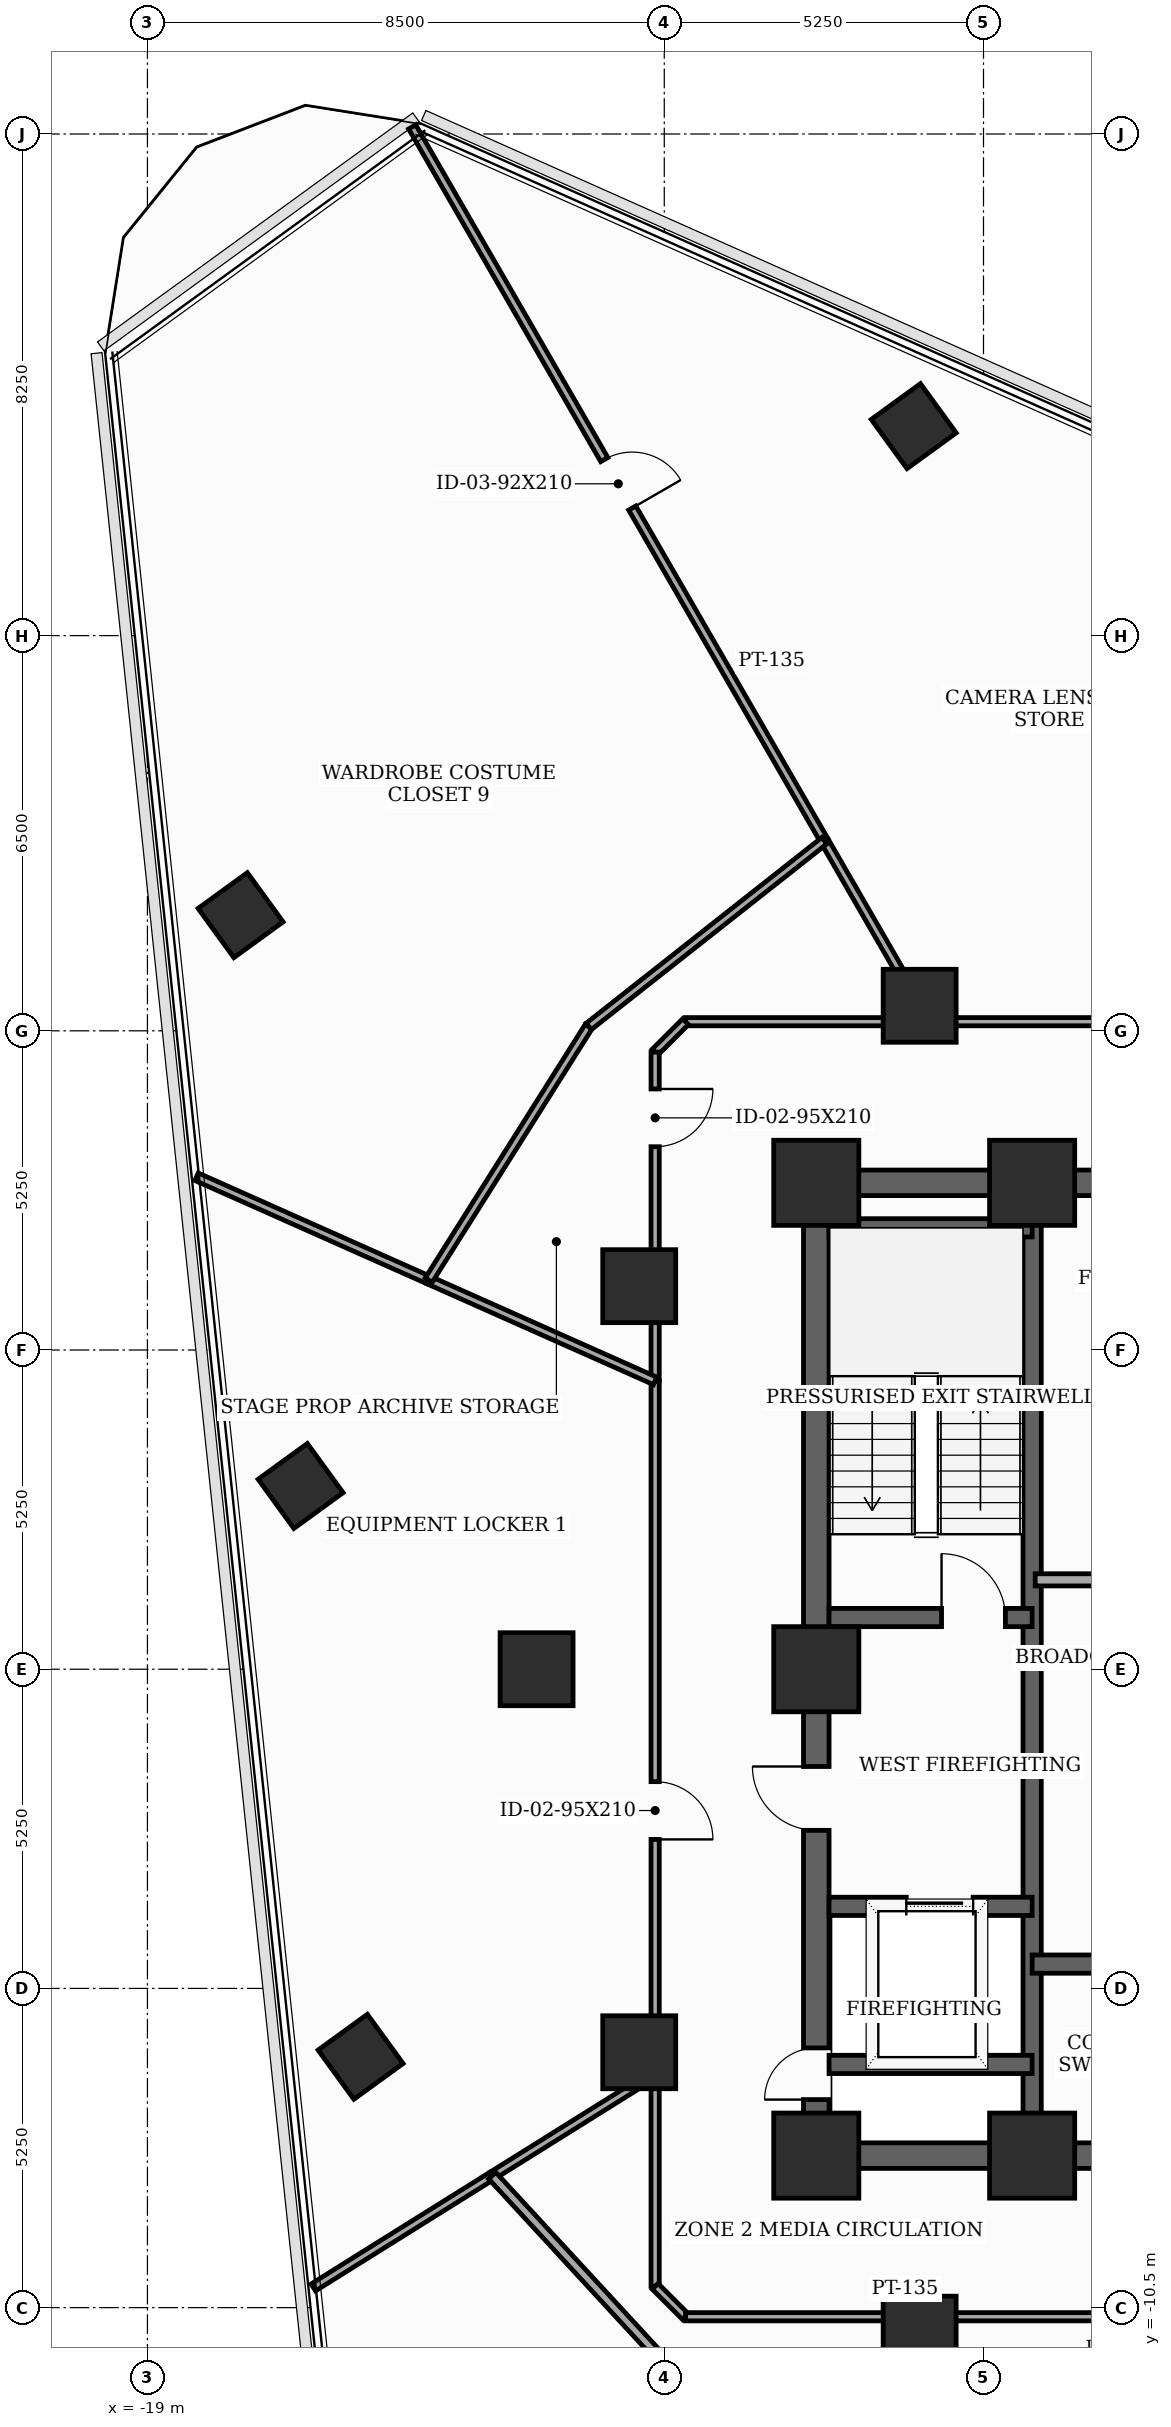
"""IFC4 building model, lengths in metres.
Left out: names, types, materials, properties, quantities, classifications, styles, units other than length and angle.
Written with IfcOpenShell. Run it as: python <this file> out.ifc"""

import sys

from ifc_helpers import new_model, si_unit, direction, frame, frame_2d, origin, origin_2d, place, context, subcontext, project, spatial, rectangle, extrude, element, fill, save


model = new_model("IFC4")
c1 = context("Model", 3, precision=1e-05, world=origin(), true_north=direction((0.0, 1.0)))
c2 = subcontext(c1, "Body", "Model", "MODEL_VIEW")
j1 = project(units=[si_unit("LENGTHUNIT", "METRE"), si_unit("PLANEANGLEUNIT", "RADIAN")], contexts=[c1])
p1 = place(None, origin())
s1 = spatial("IfcSite", under=j1, at=p1, CompositionType="ELEMENT")
p2 = place(p1, origin())
s2 = spatial("IfcBuilding", under=s1, at=p2, CompositionType="ELEMENT")
p3 = place(p2, frame((0.0, 0.0, 158.3)))
s3 = spatial("IfcBuildingStorey", under=s2, at=p3, CompositionType="ELEMENT", Elevation=158.3)
for number, where, z_axis, x_axis in (
    (1, (-8.0, -8.0, 0.0), (0.0, 0.0, 1.0), (1.0, 0.0, 0.0)),
    (2, (-4.45, -8.0, 0.0), (0.0, 0.0, 1.0), (1.0, 0.0, 0.0)),
    (3, (-4.45, 8.0, 0.0), (0.0, 0.0, 1.0), (1.0, 0.0, 0.0)),
    (4, (-8.0, 8.0, 0.0), (0.0, 0.0, 1.0), (1.0, 0.0, 0.0)),
    (5, (-8.0, 0.0, 0.0), (0.0, 0.0, 1.0), (1.0, 0.0, 0.0)),
):
    element("IfcColumn", number, at=place(p3, frame(where, z_axis=z_axis, x_axis=x_axis)), inside=s3, PredefinedType="COLUMN", context=c2, shape_type="SweptSolid", body=[
        extrude(rectangle(XDim=1.4, YDim=1.4, at=origin_2d()), origin(), (0.0, 0.0, 1.0), 3.7),
    ])
for number, where, z_axis, x_axis in (
    (6, (-6.3, 10.912, 0.0), (0.0, 0.0, 1.0), (1.0, 0.0, 0.0)),
    (7, (-10.912, 6.3, 0.0), (0.0, 0.0, 1.0), (1.0, 0.0, 0.0)),
    (8, (-12.6, 0.0, 0.0), (0.0, 0.0, 1.0), (1.0, 0.0, 0.0)),
    (9, (-10.912, -6.3, 0.0), (0.0, 0.0, 1.0), (1.0, 0.0, 0.0)),
    (10, (-6.3, -10.912, 0.0), (0.0, 0.0, 1.0), (1.0, 0.0, 0.0)),
):
    element("IfcColumn", number, at=place(p3, frame(where, z_axis=z_axis, x_axis=x_axis)), inside=s3, PredefinedType="COLUMN", context=c2, shape_type="SweptSolid", body=[
        extrude(rectangle(XDim=1.2, YDim=1.2, at=origin_2d()), origin(), (0.0, 0.0, 1.0), 3.7),
    ])
for number, where, z_axis, x_axis in (
    (11, (-6.397, 20.445, 0.0), (0.0, 0.0, 1.0), (0.809, 0.588, 0.0)),
    (12, (-17.468, 12.402, 0.0), (0.0, 0.0, 1.0), (0.809, 0.588, 0.0)),
    (13, (-16.481, 3.014, 0.0), (0.0, 0.0, 1.0), (0.809, 0.588, 0.0)),
    (14, (-15.494, -6.375, 0.0), (0.0, 0.0, 1.0), (0.809, 0.588, 0.0)),
):
    element("IfcColumn", number, at=place(p3, frame(where, z_axis=z_axis, x_axis=x_axis)), inside=s3, PredefinedType="COLUMN", context=c2, shape_type="SweptSolid", body=[
        extrude(rectangle(XDim=1.0, YDim=1.0, at=origin_2d()), origin(), (0.0, 0.0, 1.0), 3.7),
    ])
p4 = place(p3, frame((-8.0, -8.0, 0.0), z_axis=(0.0, 0.0, 1.0), x_axis=(0.0, 1.0, 0.0)))
e15 = element("IfcWall", 15, at=p4, inside=s3, PredefinedType="SHEAR", context=c2, shape_type="SweptSolid", body=[
    extrude(rectangle(XDim=16.0, YDim=0.42, at=frame_2d((8.0, 0.0))), origin(), (0.0, 0.0, 1.0), 3.5),
])
p5 = place(p4, frame((0.922, 0.0, 0.0)))
e16 = element("IfcOpeningElement", 16, at=p5, cuts=e15, PredefinedType="OPENING", context=c2, shape_type="SweptSolid", body=[
    extrude(rectangle(XDim=0.85, YDim=2.02, at=frame_2d((0.425, 1.01))), frame((0.0, 0.22, 0.0), z_axis=(0.0, -1.0, 0.0), x_axis=(1.0, 0.0, 0.0)), (0.0, 0.0, 1.0), 0.44),
])
p6 = place(p4, frame((5.35, 0.0, 0.0)))
e17 = element("IfcOpeningElement", 17, at=p6, cuts=e15, PredefinedType="OPENING", context=c2, shape_type="SweptSolid", body=[
    extrude(rectangle(XDim=1.05, YDim=2.15, at=frame_2d((0.525, 1.075))), frame((0.0, 0.22, 0.0), z_axis=(0.0, -1.0, 0.0), x_axis=(1.0, 0.0, 0.0)), (0.0, 0.0, 1.0), 0.44),
])
p7 = place(p3, frame((-8.0, -8.0, 0.0), z_axis=(0.0, 0.0, 1.0), x_axis=(1.0, 0.0, 0.0)))
e18 = element("IfcWall", 18, at=p7, inside=s3, PredefinedType="SHEAR", context=c2, shape_type="SweptSolid", body=[
    extrude(rectangle(XDim=16.0, YDim=0.42, at=frame_2d((8.0, 0.0))), origin(), (0.0, 0.0, 1.0), 3.5),
])
p8 = place(p7, frame((7.52, 0.0, 0.0)))
e19 = element("IfcOpeningElement", 19, at=p8, cuts=e18, PredefinedType="OPENING", context=c2, shape_type="SweptSolid", body=[
    extrude(rectangle(XDim=0.95, YDim=2.1, at=frame_2d((0.475, 1.05))), frame((0.0, 0.22, 0.0), z_axis=(0.0, -1.0, 0.0), x_axis=(1.0, 0.0, 0.0)), (0.0, 0.0, 1.0), 0.44),
])
p9 = place(p3, frame((-8.0, 8.0, 0.0), z_axis=(0.0, 0.0, 1.0), x_axis=(1.0, 0.0, 0.0)))
e20 = element("IfcWall", 20, at=p9, inside=s3, PredefinedType="SHEAR", context=c2, shape_type="SweptSolid", body=[
    extrude(rectangle(XDim=16.0, YDim=0.42, at=frame_2d((8.0, 0.0))), origin(), (0.0, 0.0, 1.0), 3.5),
])
p10 = place(p9, frame((7.1, 0.0, 0.0)))
e21 = element("IfcOpeningElement", 21, at=p10, cuts=e20, PredefinedType="OPENING", context=c2, shape_type="SweptSolid", body=[
    extrude(rectangle(XDim=1.8, YDim=2.15, at=frame_2d((0.9, 1.075))), frame((0.0, 0.22, 0.0), z_axis=(0.0, -1.0, 0.0), x_axis=(1.0, 0.0, 0.0)), (0.0, 0.0, 1.0), 0.44),
])
p11 = place(p3, frame((-4.45, -7.79, 0.0), z_axis=(0.0, 0.0, 1.0), x_axis=(0.0, 1.0, 0.0)))
e22 = element("IfcWall", 22, at=p11, inside=s3, PredefinedType="SHEAR", context=c2, shape_type="SweptSolid", body=[
    extrude(rectangle(XDim=15.58, YDim=0.3, at=frame_2d((7.79, 0.0))), origin(), (0.0, 0.0, 1.0), 3.5),
])
p12 = place(p3, frame((-7.79, 0.85, 0.0), z_axis=(0.0, 0.0, 1.0), x_axis=(1.0, 0.0, 0.0)))
e23 = element("IfcWall", 23, at=p12, inside=s3, PredefinedType="SHEAR", context=c2, shape_type="SweptSolid", body=[
    extrude(rectangle(XDim=3.34, YDim=0.3, at=frame_2d((1.67, 0.0))), origin(), (0.0, 0.0, 1.0), 3.5),
])
p13 = place(p12, frame((1.85, 0.0, 0.0)))
e24 = element("IfcOpeningElement", 24, at=p13, cuts=e23, PredefinedType="OPENING", context=c2, shape_type="SweptSolid", body=[
    extrude(rectangle(XDim=1.05, YDim=2.15, at=frame_2d((0.525, 1.075))), frame((0.0, 0.16, 0.0), z_axis=(0.0, -1.0, 0.0), x_axis=(1.0, 0.0, 0.0)), (0.0, 0.0, 1.0), 0.32),
])
p14 = place(p3, frame((-7.79, 7.26, 0.0), z_axis=(0.0, 0.0, 1.0), x_axis=(1.0, 0.0, 0.0)))
e25 = element("IfcWall", 25, at=p14, inside=s3, PredefinedType="SHEAR", context=c2, shape_type="SweptSolid", body=[
    extrude(rectangle(XDim=3.34, YDim=0.3, at=frame_2d((1.67, 0.0))), origin(), (0.0, 0.0, 1.0), 3.5),
])
p15 = place(p3, frame((-7.79, -3.9, 0.0), z_axis=(0.0, 0.0, 1.0), x_axis=(1.0, 0.0, 0.0)))
e26 = element("IfcWall", 26, at=p15, inside=s3, PredefinedType="SHEAR", context=c2, shape_type="SweptSolid", body=[
    extrude(rectangle(XDim=3.34, YDim=0.3, at=frame_2d((1.67, 0.0))), origin(), (0.0, 0.0, 1.0), 3.5),
])
p16 = place(p15, frame((1.27, 0.0, 0.0)))
e27 = element("IfcOpeningElement", 27, at=p16, cuts=e26, PredefinedType="OPENING", context=c2, shape_type="SweptSolid", body=[
    extrude(rectangle(XDim=1.1, YDim=2.1, at=frame_2d((0.55, 1.05))), frame((0.0, 0.16, 0.0), z_axis=(0.0, -1.0, 0.0), x_axis=(1.0, 0.0, 0.0)), (0.0, 0.0, 1.0), 0.32),
])
p17 = place(p3, frame((-7.79, -6.5, 0.0), z_axis=(0.0, 0.0, 1.0), x_axis=(1.0, 0.0, 0.0)))
e28 = element("IfcWall", 28, at=p17, inside=s3, PredefinedType="SHEAR", context=c2, shape_type="SweptSolid", body=[
    extrude(rectangle(XDim=3.34, YDim=0.3, at=frame_2d((1.67, 0.0))), origin(), (0.0, 0.0, 1.0), 3.5),
])
p18 = place(p3, frame((-4.45, -4.85, 0.0), z_axis=(0.0, 0.0, 1.0), x_axis=(1.0, 0.0, 0.0)))
e29 = element("IfcWall", 29, at=p18, inside=s3, PredefinedType="SHEAR", context=c2, shape_type="SweptSolid", body=[
    extrude(rectangle(XDim=8.9, YDim=0.3, at=frame_2d((4.45, 0.0))), origin(), (0.0, 0.0, 1.0), 3.5),
])
p19 = place(p3, frame((-4.4, 1.47, 0.0), z_axis=(0.0, 0.0, 1.0), x_axis=(1.0, 0.0, 0.0)))
e30 = element("IfcWall", 30, at=p19, inside=s3, PredefinedType="SOLIDWALL", context=c2, shape_type="SweptSolid", body=[
    extrude(rectangle(XDim=2.68, YDim=0.2, at=frame_2d((1.34, 0.0))), origin(), (0.0, 0.0, 1.0), 3.5),
])
p20 = place(p3, frame((-10.65, 4.742, 0.0), z_axis=(0.0, 0.0, 1.0), x_axis=(0.0, -1.0, 0.0)))
e31 = element("IfcWall", 31, at=p20, inside=s3, PredefinedType="PARTITIONING", context=c2, shape_type="SweptSolid", body=[
    extrude(rectangle(XDim=11.397, YDim=0.135, at=frame_2d((5.698, 0.0))), origin(), (0.0, 0.0, 1.0), 2.885),
])
p21 = place(p20, frame((6.591, 0.0, 0.0)))
e32 = element("IfcOpeningElement", 32, at=p21, cuts=e31, PredefinedType="OPENING", context=c2, shape_type="SweptSolid", body=[
    extrude(rectangle(XDim=0.95, YDim=2.1, at=frame_2d((0.475, 1.05))), frame((0.0, 0.077, 0.0), z_axis=(0.0, -1.0, 0.0), x_axis=(1.0, 0.0, 0.0)), (0.0, 0.0, 1.0), 0.155),
])
p22 = place(p3, frame((-10.65, -6.655, 0.0), z_axis=(0.0, 0.0, 1.0), x_axis=(0.0, -1.0, 0.0)))
e33 = element("IfcWall", 33, at=p22, inside=s3, PredefinedType="PARTITIONING", context=c2, shape_type="SweptSolid", body=[
    extrude(rectangle(XDim=3.495, YDim=0.135, at=frame_2d((1.748, 0.0))), origin(), (0.0, 0.0, 1.0), 2.885),
])
p23 = place(p3, frame((-10.65, -10.15, 0.0), z_axis=(0.0, 0.0, 1.0), x_axis=(0.707106781187, -0.707106781187, 0.0)))
e34 = element("IfcWall", 34, at=p23, inside=s3, PredefinedType="PARTITIONING", context=c2, shape_type="SweptSolid", body=[
    extrude(rectangle(XDim=0.707, YDim=0.135, at=frame_2d((0.354, 0.0))), origin(), (0.0, 0.0, 1.0), 3.5),
])
p24 = place(p3, frame((-10.15, -10.65, 0.0), z_axis=(0.0, 0.0, 1.0), x_axis=(1.0, 0.0, 0.0)))
e35 = element("IfcWall", 35, at=p24, inside=s3, PredefinedType="PARTITIONING", context=c2, shape_type="SweptSolid", body=[
    extrude(rectangle(XDim=12.414, YDim=0.135, at=frame_2d((6.207, 0.0))), origin(), (0.0, 0.0, 1.0), 2.885),
])
p25 = place(p24, frame((7.222, 0.0, 0.0)))
e36 = element("IfcOpeningElement", 36, at=p25, cuts=e35, PredefinedType="OPENING", context=c2, shape_type="SweptSolid", body=[
    extrude(rectangle(XDim=0.95, YDim=2.1, at=frame_2d((0.475, 1.05))), frame((0.0, 0.077, 0.0), z_axis=(0.0, -1.0, 0.0), x_axis=(1.0, 0.0, 0.0)), (0.0, 0.0, 1.0), 0.155),
])
p26 = place(p3, frame((5.194, 10.65, 0.0), z_axis=(0.0, 0.0, 1.0), x_axis=(-1.0, 0.0, 0.0)))
e37 = element("IfcWall", 37, at=p26, inside=s3, PredefinedType="PARTITIONING", context=c2, shape_type="SweptSolid", body=[
    extrude(rectangle(XDim=11.343, YDim=0.135, at=frame_2d((5.671, 0.0))), origin(), (0.0, 0.0, 1.0), 2.885),
])
p27 = place(p26, frame((6.558, 0.0, 0.0)))
e38 = element("IfcOpeningElement", 38, at=p27, cuts=e37, PredefinedType="OPENING", context=c2, shape_type="SweptSolid", body=[
    extrude(rectangle(XDim=0.95, YDim=2.1, at=frame_2d((0.475, 1.05))), frame((0.0, 0.077, 0.0), z_axis=(0.0, -1.0, 0.0), x_axis=(1.0, 0.0, 0.0)), (0.0, 0.0, 1.0), 0.155),
])
p28 = place(p3, frame((-6.149, 10.65, 0.0), z_axis=(0.0, 0.0, 1.0), x_axis=(-1.0, 0.0, 0.0)))
e39 = element("IfcWall", 39, at=p28, inside=s3, PredefinedType="PARTITIONING", context=c2, shape_type="SweptSolid", body=[
    extrude(rectangle(XDim=4.001, YDim=0.135, at=frame_2d((2.0, 0.0))), origin(), (0.0, 0.0, 1.0), 2.885),
])
p29 = place(p3, frame((-10.15, 10.65, 0.0), z_axis=(0.0, 0.0, 1.0), x_axis=(-0.707106781187, -0.707106781187, 0.0)))
e40 = element("IfcWall", 40, at=p29, inside=s3, PredefinedType="PARTITIONING", context=c2, shape_type="SweptSolid", body=[
    extrude(rectangle(XDim=0.707, YDim=0.135, at=frame_2d((0.354, 0.0))), origin(), (0.0, 0.0, 1.0), 3.5),
])
p30 = place(p3, frame((-10.65, 10.15, 0.0), z_axis=(0.0, 0.0, 1.0), x_axis=(0.0, -1.0, 0.0)))
e41 = element("IfcWall", 41, at=p30, inside=s3, PredefinedType="PARTITIONING", context=c2, shape_type="SweptSolid", body=[
    extrude(rectangle(XDim=5.408, YDim=0.135, at=frame_2d((2.704, 0.0))), origin(), (0.0, 0.0, 1.0), 2.885),
])
p31 = place(p30, frame((0.607, 0.0, 0.0)))
e42 = element("IfcOpeningElement", 42, at=p31, cuts=e41, PredefinedType="OPENING", context=c2, shape_type="SweptSolid", body=[
    extrude(rectangle(XDim=0.95, YDim=2.1, at=frame_2d((0.475, 1.05))), frame((0.0, 0.077, 0.0), z_axis=(0.0, -1.0, 0.0), x_axis=(1.0, 0.0, 0.0)), (0.0, 0.0, 1.0), 0.155),
])
p32 = place(p3, frame((-16.272, -10.167, 0.0), z_axis=(0.0, 0.0, 1.0), x_axis=(0.848097115085, 0.529840809474, 0.0)))
e43 = element("IfcWall", 43, at=p32, inside=s3, PredefinedType="PARTITIONING", context=c2, shape_type="SweptSolid", body=[
    extrude(rectangle(XDim=3.47, YDim=0.135, at=frame_2d((1.735, 0.0))), origin(), (0.0, 0.0, 1.0), 2.985),
])
p33 = place(p3, frame((-13.329, -8.329, 0.0), z_axis=(0.0, 0.0, 1.0), x_axis=(0.848059079617, 0.529901686617, 0.0)))
e44 = element("IfcWall", 44, at=p33, inside=s3, PredefinedType="PARTITIONING", context=c2, shape_type="SweptSolid", body=[
    extrude(rectangle(XDim=3.159, YDim=0.135, at=frame_2d((1.58, 0.0))), origin(), (0.0, 0.0, 1.0), 2.885),
])
p34 = place(p3, frame((-14.374, 6.4, 0.0), z_axis=(0.0, 0.0, 1.0), x_axis=(-0.913556010805, 0.406712939457, 0.0)))
e45 = element("IfcWall", 45, at=p34, inside=s3, PredefinedType="PARTITIONING", context=c2, shape_type="SweptSolid", body=[
    extrude(rectangle(XDim=4.179, YDim=0.135, at=frame_2d((2.09, 0.0))), origin(), (0.0, 0.0, 1.0), 2.985),
])
p35 = place(p3, frame((-10.65, 4.742, 0.0), z_axis=(0.0, 0.0, 1.0), x_axis=(-0.913556992648, 0.406710734042, 0.0)))
e46 = element("IfcWall", 46, at=p35, inside=s3, PredefinedType="PARTITIONING", context=c2, shape_type="SweptSolid", body=[
    extrude(rectangle(XDim=4.076, YDim=0.135, at=frame_2d((2.038, 0.0))), origin(), (0.0, 0.0, 1.0), 2.885),
])
p36 = place(p3, frame((-9.1, -12.916, 0.0), z_axis=(0.0, 0.0, 1.0), x_axis=(-0.677841155448, 0.735208384052, 0.0)))
e47 = element("IfcWall", 47, at=p36, inside=s3, PredefinedType="PARTITIONING", context=c2, shape_type="SweptSolid", body=[
    extrude(rectangle(XDim=6.239, YDim=0.16, at=frame_2d((3.12, 0.0))), origin(), (0.0, 0.0, 1.0), 2.885),
])
p37 = place(p3, frame((-14.646, 25.367, 0.0), z_axis=(0.0, 0.0, 1.0), x_axis=(0.500047745944, -0.865997835896, 0.0)))
e48 = element("IfcWall", 48, at=p37, inside=s3, PredefinedType="PARTITIONING", context=c2, shape_type="SweptSolid", body=[
    extrude(rectangle(XDim=13.556, YDim=0.135, at=frame_2d((6.778, 0.0))), origin(), (0.0, 0.0, 1.0), 2.985),
])
p38 = place(p37, frame((6.318, 0.0, 0.0)))
e49 = element("IfcOpeningElement", 49, at=p38, cuts=e48, PredefinedType="OPENING", context=c2, shape_type="SweptSolid", body=[
    extrude(rectangle(XDim=0.92, YDim=2.1, at=frame_2d((0.46, 1.05))), frame((0.0, 0.077, 0.0), z_axis=(0.0, -1.0, 0.0), x_axis=(1.0, 0.0, 0.0)), (0.0, 0.0, 1.0), 0.155),
])
p39 = place(p3, frame((-7.867, 13.627, 0.0), z_axis=(0.0, 0.0, 1.0), x_axis=(0.499829032188, -0.866124089598, 0.0)))
e50 = element("IfcWall", 50, at=p39, inside=s3, PredefinedType="PARTITIONING", context=c2, shape_type="SweptSolid", body=[
    extrude(rectangle(XDim=3.437, YDim=0.135, at=frame_2d((1.719, 0.0))), origin(), (0.0, 0.0, 1.0), 2.885),
])
p40 = place(p3, frame((-14.374, 6.4, 0.0), z_axis=(0.0, 0.0, 1.0), x_axis=(0.53356651363, 0.845758106986, 0.0)))
e51 = element("IfcWall", 51, at=p40, inside=s3, PredefinedType="PARTITIONING", context=c2, shape_type="SweptSolid", body=[
    extrude(rectangle(XDim=4.933, YDim=0.135, at=frame_2d((2.467, 0.0))), origin(), (0.0, 0.0, 1.0), 2.885),
])
p41 = place(p3, frame((-11.742, 10.572, 0.0), z_axis=(0.0, 0.0, 1.0), x_axis=(0.785304323173, 0.619109941776, 0.0)))
e52 = element("IfcWall", 52, at=p41, inside=s3, PredefinedType="PARTITIONING", context=c2, shape_type="SweptSolid", body=[
    extrude(rectangle(XDim=4.934, YDim=0.135, at=frame_2d((2.467, 0.0))), origin(), (0.0, 0.0, 1.0), 3.5),
])
p42 = place(p5, origin())
e53 = element("IfcDoor", 53, at=p42, inside=s3, OperationType="SINGLE_SWING_LEFT", PredefinedType="TRAPDOOR", context=c2, shape_type="SweptSolid", body=[
    extrude(rectangle(XDim=0.85, YDim=2.02, at=frame_2d((0.425, 1.01))), frame((0.0, 0.025, 0.0), z_axis=(0.0, -1.0, 0.0), x_axis=(1.0, 0.0, 0.0)), (0.0, 0.0, 1.0), 0.05),
])
fill(e16, e53)
p43 = place(p6, origin())
e54 = element("IfcDoor", 54, at=p43, inside=s3, OperationType="SINGLE_SWING_RIGHT", PredefinedType="DOOR", context=c2, shape_type="SweptSolid", body=[
    extrude(rectangle(XDim=1.05, YDim=2.15, at=frame_2d((0.525, 1.075))), frame((0.0, 0.025, 0.0), z_axis=(0.0, -1.0, 0.0), x_axis=(1.0, 0.0, 0.0)), (0.0, 0.0, 1.0), 0.05),
])
fill(e17, e54)
p44 = place(p13, origin())
e55 = element("IfcDoor", 55, at=p44, inside=s3, OperationType="SINGLE_SWING_LEFT", PredefinedType="DOOR", context=c2, shape_type="SweptSolid", body=[
    extrude(rectangle(XDim=1.05, YDim=2.15, at=frame_2d((0.525, 1.075))), frame((0.0, 0.025, 0.0), z_axis=(0.0, -1.0, 0.0), x_axis=(1.0, 0.0, 0.0)), (0.0, 0.0, 1.0), 0.05),
])
fill(e24, e55)
p45 = place(p16, origin())
e56 = element("IfcDoor", 56, at=p45, inside=s3, OperationType="SLIDING_TO_LEFT", PredefinedType="DOOR", context=c2, shape_type="SweptSolid", body=[
    extrude(rectangle(XDim=1.1, YDim=2.1, at=frame_2d((0.55, 1.05))), frame((0.0, 0.025, 0.0), z_axis=(0.0, -1.0, 0.0), x_axis=(1.0, 0.0, 0.0)), (0.0, 0.0, 1.0), 0.05),
])
fill(e27, e56)
p46 = place(p21, origin())
e57 = element("IfcDoor", 57, at=p46, inside=s3, OperationType="SINGLE_SWING_RIGHT", PredefinedType="DOOR", context=c2, shape_type="SweptSolid", body=[
    extrude(rectangle(XDim=0.95, YDim=2.1, at=frame_2d((0.475, 1.05))), frame((0.0, 0.025, 0.0), z_axis=(0.0, -1.0, 0.0), x_axis=(1.0, 0.0, 0.0)), (0.0, 0.0, 1.0), 0.05),
])
fill(e32, e57)
p47 = place(p31, origin())
e58 = element("IfcDoor", 58, at=p47, inside=s3, OperationType="SINGLE_SWING_LEFT", PredefinedType="DOOR", context=c2, shape_type="SweptSolid", body=[
    extrude(rectangle(XDim=0.95, YDim=2.1, at=frame_2d((0.475, 1.05))), frame((0.0, 0.025, 0.0), z_axis=(0.0, -1.0, 0.0), x_axis=(1.0, 0.0, 0.0)), (0.0, 0.0, 1.0), 0.05),
])
fill(e42, e58)
p48 = place(p38, origin())
e59 = element("IfcDoor", 59, at=p48, inside=s3, OperationType="SINGLE_SWING_RIGHT", PredefinedType="DOOR", context=c2, shape_type="SweptSolid", body=[
    extrude(rectangle(XDim=0.92, YDim=2.1, at=frame_2d((0.46, 1.05))), frame((0.0, 0.025, 0.0), z_axis=(0.0, -1.0, 0.0), x_axis=(1.0, 0.0, 0.0)), (0.0, 0.0, 1.0), 0.05),
])
fill(e49, e59)
save(model, sys.argv[1])
